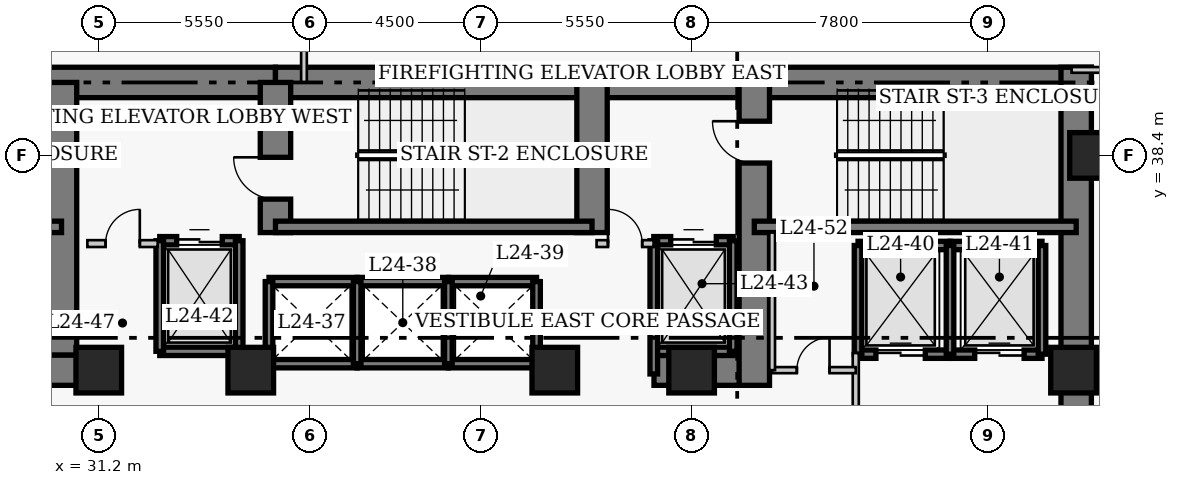
"""IFC4 building model, lengths in metres.
Left out: names, types, materials, properties, quantities, classifications, styles, units other than length and angle.
Written with IfcOpenShell. Run it as: python <this file> out.ifc"""

import sys

from ifc_helpers import new_model, si_unit, direction, frame, frame_2d, origin, origin_2d, place, context, subcontext, project, spatial, rectangle, extrude, element, fill, save


model = new_model("IFC4")
c1 = context("Model", 3, precision=1e-05, world=origin(), true_north=direction((0.0, 1.0)))
c2 = subcontext(c1, "Body", "Model", "MODEL_VIEW")
j1 = project(units=[si_unit("LENGTHUNIT", "METRE"), si_unit("PLANEANGLEUNIT", "RADIAN")], contexts=[c1])
p1 = place(None, origin())
s1 = spatial("IfcSite", under=j1, at=p1, CompositionType="ELEMENT")
p2 = place(p1, origin())
s2 = spatial("IfcBuilding", under=s1, at=p2, CompositionType="ELEMENT")
p3 = place(p2, frame((0.0, 0.0, 99.4)))
s3 = spatial("IfcBuildingStorey", under=s2, at=p3, CompositionType="ELEMENT", Elevation=99.4)
p4 = place(p3, frame((21.5, 40.32, 0.0), z_axis=(0.0, 0.0, 1.0), x_axis=(1.0, 0.0, 0.0)))
e1 = element("IfcWall", 1, at=p4, inside=s3, PredefinedType="SHEAR", context=c2, shape_type="SweptSolid", body=[
    extrude(rectangle(XDim=14.35, YDim=0.8, at=frame_2d((7.175, 0.0))), origin(), (0.0, 0.0, 1.0), 3.8),
])
p5 = place(p3, frame((35.85, 40.32, 0.0), z_axis=(0.0, 0.0, 1.0), x_axis=(1.0, 0.0, 0.0)))
e2 = element("IfcWall", 2, at=p5, inside=s3, PredefinedType="SHEAR", context=c2, shape_type="SweptSolid", body=[
    extrude(rectangle(XDim=12.6, YDim=0.8, at=frame_2d((6.3, 0.0))), origin(), (0.0, 0.0, 1.0), 3.8),
])
p6 = place(p3, frame((48.45, 40.32, 0.0), z_axis=(0.0, 0.0, 1.0), x_axis=(1.0, 0.0, 0.0)))
e3 = element("IfcWall", 3, at=p6, inside=s3, PredefinedType="SHEAR", context=c2, shape_type="SweptSolid", body=[
    extrude(rectangle(XDim=8.87, YDim=0.8, at=frame_2d((4.435, 0.0))), origin(), (0.0, 0.0, 1.0), 3.8),
])
p7 = place(p3, frame((56.92, 27.05, 0.0), z_axis=(0.0, 0.0, 1.0), x_axis=(0.0, 1.0, 0.0)))
e4 = element("IfcWall", 4, at=p7, inside=s3, PredefinedType="SHEAR", context=c2, shape_type="SweptSolid", body=[
    extrude(rectangle(XDim=13.67, YDim=0.8, at=frame_2d((6.835, 0.0))), origin(), (0.0, 0.0, 1.0), 3.8),
])
p8 = place(p3, frame((28.45, 32.75, 0.0), z_axis=(0.0, 0.0, 1.0), x_axis=(1.0, 0.0, 0.0)))
e5 = element("IfcWall", 5, at=p8, inside=s3, PredefinedType="SHEAR", context=c2, shape_type="SweptSolid", body=[
    extrude(rectangle(XDim=2.4, YDim=0.8, at=frame_2d((1.2, 0.0))), origin(), (0.0, 0.0, 1.0), 3.8),
])
p9 = place(p3, frame((45.81, 32.75, 0.0), z_axis=(0.0, 0.0, 1.0), x_axis=(1.0, 0.0, 0.0)))
e6 = element("IfcWall", 6, at=p9, inside=s3, PredefinedType="SHEAR", context=c2, shape_type="SweptSolid", body=[
    extrude(rectangle(XDim=2.64, YDim=0.8, at=frame_2d((1.32, 0.0))), origin(), (0.0, 0.0, 1.0), 3.8),
])
p10 = place(p3, frame((30.22, 33.15, 0.0), z_axis=(0.0, 0.0, 1.0), x_axis=(0.0, 1.0, 0.0)))
e7 = element("IfcWall", 7, at=p10, inside=s3, PredefinedType="SHEAR", context=c2, shape_type="SweptSolid", body=[
    extrude(rectangle(XDim=7.17, YDim=0.8, at=frame_2d((3.585, 0.0))), origin(), (0.0, 0.0, 1.0), 3.8),
])
p11 = place(p3, frame((35.85, 36.37, 0.0), z_axis=(0.0, 0.0, 1.0), x_axis=(0.0, 1.0, 0.0)))
e8 = element("IfcWall", 8, at=p11, inside=s3, PredefinedType="SHEAR", context=c2, shape_type="SweptSolid", body=[
    extrude(rectangle(XDim=3.95, YDim=0.8, at=frame_2d((1.975, 0.0))), origin(), (0.0, 0.0, 1.0), 3.8),
])
p12 = place(p11, frame((0.88, 0.0, 0.0)))
e9 = element("IfcOpeningElement", 9, at=p12, cuts=e8, PredefinedType="OPENING", context=c2, shape_type="SweptSolid", body=[
    extrude(rectangle(XDim=1.1, YDim=2.15, at=frame_2d((0.55, 1.075))), frame((0.0, 0.41, 0.0), z_axis=(0.0, -1.0, 0.0), x_axis=(1.0, 0.0, 0.0)), (0.0, 0.0, 1.0), 0.82),
])
p13 = place(p3, frame((44.18, 36.37, 0.0), z_axis=(0.0, 0.0, 1.0), x_axis=(0.0, 1.0, 0.0)))
e10 = element("IfcWall", 10, at=p13, inside=s3, PredefinedType="SHEAR", context=c2, shape_type="SweptSolid", body=[
    extrude(rectangle(XDim=3.95, YDim=0.8, at=frame_2d((1.975, 0.0))), origin(), (0.0, 0.0, 1.0), 3.8),
])
p14 = place(p3, frame((48.45, 32.35, 0.0), z_axis=(0.0, 0.0, 1.0), x_axis=(0.0, 1.0, 0.0)))
e11 = element("IfcWall", 11, at=p14, inside=s3, PredefinedType="SHEAR", context=c2, shape_type="SweptSolid", body=[
    extrude(rectangle(XDim=7.97, YDim=0.8, at=frame_2d((3.985, 0.0))), origin(), (0.0, 0.0, 1.0), 3.8),
])
p15 = place(p14, frame((5.85, 0.0, 0.0)))
e12 = element("IfcOpeningElement", 12, at=p15, cuts=e11, PredefinedType="OPENING", context=c2, shape_type="SweptSolid", body=[
    extrude(rectangle(XDim=1.1, YDim=2.15, at=frame_2d((0.55, 1.075))), frame((0.0, 0.41, 0.0), z_axis=(0.0, -1.0, 0.0), x_axis=(1.0, 0.0, 0.0)), (0.0, 0.0, 1.0), 0.82),
])
p16 = place(p3, frame((21.9, 36.52, 0.0), z_axis=(0.0, 0.0, 1.0), x_axis=(1.0, 0.0, 0.0)))
e13 = element("IfcWall", 13, at=p16, inside=s3, PredefinedType="SHEAR", context=c2, shape_type="SweptSolid", body=[
    extrude(rectangle(XDim=8.32, YDim=0.3, at=frame_2d((4.16, 0.0))), origin(), (0.0, 0.0, 1.0), 3.8),
])
p17 = place(p16, frame((0.9, 0.0, 0.0)))
e14 = element("IfcOpeningElement", 14, at=p17, cuts=e13, PredefinedType="OPENING", context=c2, shape_type="SweptSolid", body=[
    extrude(rectangle(XDim=1.1, YDim=2.15, at=frame_2d((0.55, 1.075))), frame((0.0, 0.16, 0.0), z_axis=(0.0, -1.0, 0.0), x_axis=(1.0, 0.0, 0.0)), (0.0, 0.0, 1.0), 0.32),
])
p18 = place(p3, frame((35.85, 36.52, 0.0), z_axis=(0.0, 0.0, 1.0), x_axis=(1.0, 0.0, 0.0)))
e15 = element("IfcWall", 15, at=p18, inside=s3, PredefinedType="SHEAR", context=c2, shape_type="SweptSolid", body=[
    extrude(rectangle(XDim=8.33, YDim=0.3, at=frame_2d((4.165, 0.0))), origin(), (0.0, 0.0, 1.0), 3.8),
])
p19 = place(p3, frame((48.45, 36.52, 0.0), z_axis=(0.0, 0.0, 1.0), x_axis=(1.0, 0.0, 0.0)))
e16 = element("IfcWall", 16, at=p19, inside=s3, PredefinedType="SHEAR", context=c2, shape_type="SweptSolid", body=[
    extrude(rectangle(XDim=8.47, YDim=0.3, at=frame_2d((4.235, 0.0))), origin(), (0.0, 0.0, 1.0), 3.8),
])
for number, where, z_axis, x_axis in (
    (17, (57.35, 38.4, 0.0), (0.0, 0.0, 1.0), (1.0, 0.0, 0.0)),
    (18, (31.2, 32.75, 0.0), (0.0, 0.0, 1.0), (1.0, 0.0, 0.0)),
    (19, (35.2, 32.75, 0.0), (0.0, 0.0, 1.0), (1.0, 0.0, 0.0)),
    (20, (43.2, 32.75, 0.0), (0.0, 0.0, 1.0), (1.0, 0.0, 0.0)),
    (21, (46.8, 32.75, 0.0), (0.0, 0.0, 1.0), (1.0, 0.0, 0.0)),
    (22, (56.85, 32.75, 0.0), (0.0, 0.0, 1.0), (1.0, 0.0, 0.0)),
):
    element("IfcColumn", number, at=place(p3, frame(where, z_axis=z_axis, x_axis=x_axis)), inside=s3, PredefinedType="COLUMN", context=c2, shape_type="SweptSolid", body=[
        extrude(rectangle(XDim=1.2, YDim=1.2, at=origin_2d()), origin(), (0.0, 0.0, 1.0), 3.8),
    ])
for number, where, z_axis, x_axis in (
    (23, (35.68, 35.08, 0.0), (0.0, 0.0, 1.0), (1.0, 0.0, 0.0)),
    (24, (35.68, 32.92, 0.0), (0.0, 0.0, 1.0), (1.0, 0.0, 0.0)),
):
    element("IfcWall", number, at=place(p3, frame(where, z_axis=z_axis, x_axis=x_axis)), inside=s3, PredefinedType="SHEAR", context=c2, shape_type="SweptSolid", body=[
        extrude(rectangle(XDim=2.32, YDim=0.22, at=frame_2d((1.16, 0.0))), origin(), (0.0, 0.0, 1.0), 3.8),
    ])
p20 = place(p3, frame((35.68, 32.92, 0.0), z_axis=(0.0, 0.0, 1.0), x_axis=(0.0, 1.0, 0.0)))
e25 = element("IfcWall", 25, at=p20, inside=s3, PredefinedType="SHEAR", context=c2, shape_type="SweptSolid", body=[
    extrude(rectangle(XDim=2.16, YDim=0.2, at=frame_2d((1.08, 0.0))), origin(), (0.0, 0.0, 1.0), 3.8),
])
for number, where, z_axis, x_axis in (
    (26, (38.0, 35.08, 0.0), (0.0, 0.0, 1.0), (1.0, 0.0, 0.0)),
    (27, (38.0, 32.92, 0.0), (0.0, 0.0, 1.0), (1.0, 0.0, 0.0)),
):
    element("IfcWall", number, at=place(p3, frame(where, z_axis=z_axis, x_axis=x_axis)), inside=s3, PredefinedType="SHEAR", context=c2, shape_type="SweptSolid", body=[
        extrude(rectangle(XDim=2.4, YDim=0.22, at=frame_2d((1.2, 0.0))), origin(), (0.0, 0.0, 1.0), 3.8),
    ])
p21 = place(p3, frame((38.0, 32.92, 0.0), z_axis=(0.0, 0.0, 1.0), x_axis=(0.0, 1.0, 0.0)))
e28 = element("IfcWall", 28, at=p21, inside=s3, PredefinedType="SHEAR", context=c2, shape_type="SweptSolid", body=[
    extrude(rectangle(XDim=2.16, YDim=0.2, at=frame_2d((1.08, 0.0))), origin(), (0.0, 0.0, 1.0), 3.8),
])
for number, where, z_axis, x_axis in (
    (29, (40.4, 35.08, 0.0), (0.0, 0.0, 1.0), (1.0, 0.0, 0.0)),
    (30, (40.4, 32.92, 0.0), (0.0, 0.0, 1.0), (1.0, 0.0, 0.0)),
):
    element("IfcWall", number, at=place(p3, frame(where, z_axis=z_axis, x_axis=x_axis)), inside=s3, PredefinedType="SHEAR", context=c2, shape_type="SweptSolid", body=[
        extrude(rectangle(XDim=2.32, YDim=0.22, at=frame_2d((1.16, 0.0))), origin(), (0.0, 0.0, 1.0), 3.8),
    ])
for number, where, z_axis, x_axis in (
    (31, (40.4, 32.92, 0.0), (0.0, 0.0, 1.0), (0.0, 1.0, 0.0)),
    (32, (42.72, 32.92, 0.0), (0.0, 0.0, 1.0), (0.0, 1.0, 0.0)),
):
    element("IfcWall", number, at=place(p3, frame(where, z_axis=z_axis, x_axis=x_axis)), inside=s3, PredefinedType="SHEAR", context=c2, shape_type="SweptSolid", body=[
        extrude(rectangle(XDim=2.16, YDim=0.2, at=frame_2d((1.08, 0.0))), origin(), (0.0, 0.0, 1.0), 3.8),
    ])
p22 = place(p3, frame((51.18, 36.03, 0.0), z_axis=(0.0, 0.0, 1.0), x_axis=(1.0, 0.0, 0.0)))
e33 = element("IfcWall", 33, at=p22, inside=s3, PredefinedType="SHEAR", context=c2, shape_type="SweptSolid", body=[
    extrude(rectangle(XDim=2.42, YDim=0.22, at=frame_2d((1.21, 0.0))), origin(), (0.0, 0.0, 1.0), 3.8),
])
p23 = place(p3, frame((51.18, 33.17, 0.0), z_axis=(0.0, 0.0, 1.0), x_axis=(1.0, 0.0, 0.0)))
e34 = element("IfcWall", 34, at=p23, inside=s3, PredefinedType="SHEAR", context=c2, shape_type="SweptSolid", body=[
    extrude(rectangle(XDim=2.42, YDim=0.22, at=frame_2d((1.21, 0.0))), origin(), (0.0, 0.0, 1.0), 3.8),
])
p24 = place(p23, frame((0.47, 0.0, 0.0)))
e35 = element("IfcOpeningElement", 35, at=p24, cuts=e34, PredefinedType="OPENING", context=c2, shape_type="SweptSolid", body=[
    extrude(rectangle(XDim=1.3, YDim=2.15, at=frame_2d((0.65, 1.075))), frame((0.0, 0.12, 0.0), z_axis=(0.0, -1.0, 0.0), x_axis=(1.0, 0.0, 0.0)), (0.0, 0.0, 1.0), 0.24),
])
p25 = place(p3, frame((51.18, 33.17, 0.0), z_axis=(0.0, 0.0, 1.0), x_axis=(0.0, 1.0, 0.0)))
e36 = element("IfcWall", 36, at=p25, inside=s3, PredefinedType="SHEAR", context=c2, shape_type="SweptSolid", body=[
    extrude(rectangle(XDim=2.86, YDim=0.2, at=frame_2d((1.43, 0.0))), origin(), (0.0, 0.0, 1.0), 3.8),
])
p26 = place(p3, frame((53.6, 36.03, 0.0), z_axis=(0.0, 0.0, 1.0), x_axis=(1.0, 0.0, 0.0)))
e37 = element("IfcWall", 37, at=p26, inside=s3, PredefinedType="SHEAR", context=c2, shape_type="SweptSolid", body=[
    extrude(rectangle(XDim=2.42, YDim=0.22, at=frame_2d((1.21, 0.0))), origin(), (0.0, 0.0, 1.0), 3.8),
])
p27 = place(p3, frame((53.6, 33.17, 0.0), z_axis=(0.0, 0.0, 1.0), x_axis=(1.0, 0.0, 0.0)))
e38 = element("IfcWall", 38, at=p27, inside=s3, PredefinedType="SHEAR", context=c2, shape_type="SweptSolid", body=[
    extrude(rectangle(XDim=2.42, YDim=0.22, at=frame_2d((1.21, 0.0))), origin(), (0.0, 0.0, 1.0), 3.8),
])
p28 = place(p27, frame((0.65, 0.0, 0.0)))
e39 = element("IfcOpeningElement", 39, at=p28, cuts=e38, PredefinedType="OPENING", context=c2, shape_type="SweptSolid", body=[
    extrude(rectangle(XDim=1.3, YDim=2.15, at=frame_2d((0.65, 1.075))), frame((0.0, 0.12, 0.0), z_axis=(0.0, -1.0, 0.0), x_axis=(1.0, 0.0, 0.0)), (0.0, 0.0, 1.0), 0.24),
])
for number, where, z_axis, x_axis in (
    (40, (53.6, 33.17, 0.0), (0.0, 0.0, 1.0), (0.0, 1.0, 0.0)),
    (41, (56.02, 33.17, 0.0), (0.0, 0.0, 1.0), (0.0, 1.0, 0.0)),
):
    element("IfcWall", number, at=place(p3, frame(where, z_axis=z_axis, x_axis=x_axis)), inside=s3, PredefinedType="SHEAR", context=c2, shape_type="SweptSolid", body=[
        extrude(rectangle(XDim=2.86, YDim=0.2, at=frame_2d((1.43, 0.0))), origin(), (0.0, 0.0, 1.0), 3.8),
    ])
p29 = place(p3, frame((32.805, 36.155, 0.0), z_axis=(0.0, 0.0, 1.0), x_axis=(1.0, 0.0, 0.0)))
e42 = element("IfcWall", 42, at=p29, inside=s3, PredefinedType="SHEAR", context=c2, shape_type="SweptSolid", body=[
    extrude(rectangle(XDim=2.09, YDim=0.22, at=frame_2d((1.045, 0.0))), origin(), (0.0, 0.0, 1.0), 3.8),
])
p30 = place(p29, frame((0.445, 0.0, 0.0)))
e43 = element("IfcOpeningElement", 43, at=p30, cuts=e42, PredefinedType="OPENING", context=c2, shape_type="SweptSolid", body=[
    extrude(rectangle(XDim=1.2, YDim=2.15, at=frame_2d((0.6, 1.075))), frame((0.0, 0.12, 0.0), z_axis=(0.0, -1.0, 0.0), x_axis=(1.0, 0.0, 0.0)), (0.0, 0.0, 1.0), 0.24),
])
p31 = place(p3, frame((32.805, 33.245, 0.0), z_axis=(0.0, 0.0, 1.0), x_axis=(1.0, 0.0, 0.0)))
e44 = element("IfcWall", 44, at=p31, inside=s3, PredefinedType="SHEAR", context=c2, shape_type="SweptSolid", body=[
    extrude(rectangle(XDim=2.09, YDim=0.22, at=frame_2d((1.045, 0.0))), origin(), (0.0, 0.0, 1.0), 3.8),
])
for number, where, z_axis, x_axis in (
    (45, (32.805, 33.245, 0.0), (0.0, 0.0, 1.0), (0.0, 1.0, 0.0)),
    (46, (34.895, 33.245, 0.0), (0.0, 0.0, 1.0), (0.0, 1.0, 0.0)),
):
    element("IfcWall", number, at=place(p3, frame(where, z_axis=z_axis, x_axis=x_axis)), inside=s3, PredefinedType="SHEAR", context=c2, shape_type="SweptSolid", body=[
        extrude(rectangle(XDim=2.91, YDim=0.2, at=frame_2d((1.455, 0.0))), origin(), (0.0, 0.0, 1.0), 3.8),
    ])
p32 = place(p3, frame((45.805, 36.155, 0.0), z_axis=(0.0, 0.0, 1.0), x_axis=(1.0, 0.0, 0.0)))
e47 = element("IfcWall", 47, at=p32, inside=s3, PredefinedType="SHEAR", context=c2, shape_type="SweptSolid", body=[
    extrude(rectangle(XDim=2.09, YDim=0.22, at=frame_2d((1.045, 0.0))), origin(), (0.0, 0.0, 1.0), 3.8),
])
p33 = place(p32, frame((0.445, 0.0, 0.0)))
e48 = element("IfcOpeningElement", 48, at=p33, cuts=e47, PredefinedType="OPENING", context=c2, shape_type="SweptSolid", body=[
    extrude(rectangle(XDim=1.2, YDim=2.15, at=frame_2d((0.6, 1.075))), frame((0.0, 0.12, 0.0), z_axis=(0.0, -1.0, 0.0), x_axis=(1.0, 0.0, 0.0)), (0.0, 0.0, 1.0), 0.24),
])
p34 = place(p3, frame((45.805, 33.245, 0.0), z_axis=(0.0, 0.0, 1.0), x_axis=(1.0, 0.0, 0.0)))
e49 = element("IfcWall", 49, at=p34, inside=s3, PredefinedType="SHEAR", context=c2, shape_type="SweptSolid", body=[
    extrude(rectangle(XDim=2.09, YDim=0.22, at=frame_2d((1.045, 0.0))), origin(), (0.0, 0.0, 1.0), 3.8),
])
p35 = place(p3, frame((45.805, 32.65, 0.0), z_axis=(0.0, 0.0, 1.0), x_axis=(0.0, 1.0, 0.0)))
e50 = element("IfcWall", 50, at=p35, inside=s3, PredefinedType="SHEAR", context=c2, shape_type="SweptSolid", body=[
    extrude(rectangle(XDim=3.505, YDim=0.2, at=frame_2d((1.752, 0.0))), origin(), (0.0, 0.0, 1.0), 3.8),
])
p36 = place(p3, frame((47.895, 33.245, 0.0), z_axis=(0.0, 0.0, 1.0), x_axis=(0.0, 1.0, 0.0)))
e51 = element("IfcWall", 51, at=p36, inside=s3, PredefinedType="SHEAR", context=c2, shape_type="SweptSolid", body=[
    extrude(rectangle(XDim=2.91, YDim=0.2, at=frame_2d((1.455, 0.0))), origin(), (0.0, 0.0, 1.0), 3.8),
])
p37 = place(p3, frame((30.9, 36.08, 0.0), z_axis=(0.0, 0.0, 1.0), x_axis=(1.0, 0.0, 0.0)))
e52 = element("IfcWall", 52, at=p37, inside=s3, PredefinedType="PARTITIONING", context=c2, shape_type="SweptSolid", body=[
    extrude(rectangle(XDim=1.85, YDim=0.18, at=frame_2d((0.925, 0.0))), origin(), (0.0, 0.0, 1.0), 3.54),
])
p38 = place(p37, frame((0.48, 0.0, 0.0)))
e53 = element("IfcOpeningElement", 53, at=p38, cuts=e52, PredefinedType="OPENING", context=c2, shape_type="SweptSolid", body=[
    extrude(rectangle(XDim=0.9, YDim=2.15, at=frame_2d((0.45, 1.075))), frame((0.0, 0.1, 0.0), z_axis=(0.0, -1.0, 0.0), x_axis=(1.0, 0.0, 0.0)), (0.0, 0.0, 1.0), 0.2),
])
p39 = place(p3, frame((44.3, 36.08, 0.0), z_axis=(0.0, 0.0, 1.0), x_axis=(1.0, 0.0, 0.0)))
e54 = element("IfcWall", 54, at=p39, inside=s3, PredefinedType="PARTITIONING", context=c2, shape_type="SweptSolid", body=[
    extrude(rectangle(XDim=1.5, YDim=0.18, at=frame_2d((0.75, 0.0))), origin(), (0.0, 0.0, 1.0), 3.54),
])
p40 = place(p39, frame((0.3, 0.0, 0.0)))
e55 = element("IfcOpeningElement", 55, at=p40, cuts=e54, PredefinedType="OPENING", context=c2, shape_type="SweptSolid", body=[
    extrude(rectangle(XDim=0.9, YDim=2.15, at=frame_2d((0.45, 1.075))), frame((0.0, 0.1, 0.0), z_axis=(0.0, -1.0, 0.0), x_axis=(1.0, 0.0, 0.0)), (0.0, 0.0, 1.0), 0.2),
])
p41 = place(p3, frame((51.12, 29.5, 0.0), z_axis=(0.0, 0.0, 1.0), x_axis=(0.0, 1.0, 0.0)))
e56 = element("IfcWall", 56, at=p41, inside=s3, PredefinedType="PARTITIONING", context=c2, shape_type="SweptSolid", body=[
    extrude(rectangle(XDim=3.7, YDim=0.16, at=frame_2d((1.85, 0.0))), origin(), (0.0, 0.0, 1.0), 3.54),
])
p42 = place(p41, frame((0.9, 0.0, 0.0)))
e57 = element("IfcOpeningElement", 57, at=p42, cuts=e56, PredefinedType="OPENING", context=c2, shape_type="SweptSolid", body=[
    extrude(rectangle(XDim=1.1, YDim=2.15, at=frame_2d((0.55, 1.075))), frame((0.0, 0.09, 0.0), z_axis=(0.0, -1.0, 0.0), x_axis=(1.0, 0.0, 0.0)), (0.0, 0.0, 1.0), 0.18),
])
p43 = place(p3, frame((48.92, 32.75, 0.0), z_axis=(0.0, 0.0, 1.0), x_axis=(1.0, 0.0, 0.0)))
e58 = element("IfcWall", 58, at=p43, inside=s3, PredefinedType="PARTITIONING", context=c2, shape_type="SweptSolid", body=[
    extrude(rectangle(XDim=2.2, YDim=0.16, at=frame_2d((1.1, 0.0))), origin(), (0.0, 0.0, 1.0), 3.54),
])
p44 = place(p43, frame((0.65, 0.0, 0.0)))
e59 = element("IfcOpeningElement", 59, at=p44, cuts=e58, PredefinedType="OPENING", context=c2, shape_type="SweptSolid", body=[
    extrude(rectangle(XDim=0.86, YDim=2.05, at=frame_2d((0.43, 1.025))), frame((0.0, 0.09, 0.0), z_axis=(0.0, -1.0, 0.0), x_axis=(1.0, 0.0, 0.0)), (0.0, 0.0, 1.0), 0.18),
])
p45 = place(p3, frame((48.92, 32.75, 0.0), z_axis=(0.0, 0.0, 1.0), x_axis=(0.0, 1.0, 0.0)))
e60 = element("IfcWall", 60, at=p45, inside=s3, PredefinedType="PARTITIONING", context=c2, shape_type="SweptSolid", body=[
    extrude(rectangle(XDim=3.62, YDim=0.15, at=frame_2d((1.81, 0.0))), origin(), (0.0, 0.0, 1.0), 3.54),
])
p46 = place(p3, frame((56.8, 40.65, 0.0), z_axis=(0.0, 0.0, 1.0), x_axis=(1.0, 0.0, 0.0)))
e61 = element("IfcWall", 61, at=p46, inside=s3, PredefinedType="PARTITIONING", context=c2, shape_type="SweptSolid", body=[
    extrude(rectangle(XDim=4.56, YDim=0.15, at=frame_2d((2.28, 0.0))), origin(), (0.0, 0.0, 1.0), 3.54),
])
p47 = place(p46, frame((2.95, 0.0, 0.0)))
e62 = element("IfcOpeningElement", 62, at=p47, cuts=e61, PredefinedType="OPENING", context=c2, shape_type="SweptSolid", body=[
    extrude(rectangle(XDim=1.0, YDim=2.15, at=frame_2d((0.5, 1.075))), frame((0.0, 0.085, 0.0), z_axis=(0.0, -1.0, 0.0), x_axis=(1.0, 0.0, 0.0)), (0.0, 0.0, 1.0), 0.17),
])
p48 = place(p3, frame((36.6, 40.32, 0.0), z_axis=(0.0, 0.0, 1.0), x_axis=(0.0, 1.0, 0.0)))
e63 = element("IfcWall", 63, at=p48, inside=s3, PredefinedType="PARTITIONING", context=c2, shape_type="SweptSolid", body=[
    extrude(rectangle(XDim=3.445, YDim=0.15, at=frame_2d((1.723, 0.0))), origin(), (0.0, 0.0, 1.0), 3.54),
])
p49 = place(p24, origin())
e64 = element("IfcDoor", 64, at=p49, inside=s3, OperationType="DOUBLE_DOOR_SLIDING", PredefinedType="DOOR", context=c2, shape_type="SweptSolid", body=[
    extrude(rectangle(XDim=1.3, YDim=2.15, at=frame_2d((0.65, 1.075))), frame((0.0, 0.025, 0.0), z_axis=(0.0, -1.0, 0.0), x_axis=(1.0, 0.0, 0.0)), (0.0, 0.0, 1.0), 0.05),
])
fill(e35, e64)
p50 = place(p28, origin())
e65 = element("IfcDoor", 65, at=p50, inside=s3, OperationType="DOUBLE_DOOR_SLIDING", PredefinedType="DOOR", context=c2, shape_type="SweptSolid", body=[
    extrude(rectangle(XDim=1.3, YDim=2.15, at=frame_2d((0.65, 1.075))), frame((0.0, 0.025, 0.0), z_axis=(0.0, -1.0, 0.0), x_axis=(1.0, 0.0, 0.0)), (0.0, 0.0, 1.0), 0.05),
])
fill(e39, e65)
p51 = place(p30, origin())
e66 = element("IfcDoor", 66, at=p51, inside=s3, OperationType="DOUBLE_DOOR_SLIDING", PredefinedType="DOOR", context=c2, shape_type="SweptSolid", body=[
    extrude(rectangle(XDim=1.2, YDim=2.15, at=frame_2d((0.6, 1.075))), frame((0.0, 0.025, 0.0), z_axis=(0.0, -1.0, 0.0), x_axis=(1.0, 0.0, 0.0)), (0.0, 0.0, 1.0), 0.05),
])
fill(e43, e66)
p52 = place(p33, origin())
e67 = element("IfcDoor", 67, at=p52, inside=s3, OperationType="DOUBLE_DOOR_SLIDING", PredefinedType="DOOR", context=c2, shape_type="SweptSolid", body=[
    extrude(rectangle(XDim=1.2, YDim=2.15, at=frame_2d((0.6, 1.075))), frame((0.0, 0.025, 0.0), z_axis=(0.0, -1.0, 0.0), x_axis=(1.0, 0.0, 0.0)), (0.0, 0.0, 1.0), 0.05),
])
fill(e48, e67)
p53 = place(p38, origin())
e68 = element("IfcDoor", 68, at=p53, inside=s3, OperationType="SINGLE_SWING_RIGHT", PredefinedType="DOOR", context=c2, shape_type="SweptSolid", body=[
    extrude(rectangle(XDim=0.9, YDim=2.15, at=frame_2d((0.45, 1.075))), frame((0.0, 0.025, 0.0), z_axis=(0.0, -1.0, 0.0), x_axis=(1.0, 0.0, 0.0)), (0.0, 0.0, 1.0), 0.05),
])
fill(e53, e68)
p54 = place(p40, origin())
e69 = element("IfcDoor", 69, at=p54, inside=s3, OperationType="SINGLE_SWING_LEFT", PredefinedType="DOOR", context=c2, shape_type="SweptSolid", body=[
    extrude(rectangle(XDim=0.9, YDim=2.15, at=frame_2d((0.45, 1.075))), frame((0.0, 0.025, 0.0), z_axis=(0.0, -1.0, 0.0), x_axis=(1.0, 0.0, 0.0)), (0.0, 0.0, 1.0), 0.05),
])
fill(e55, e69)
p55 = place(p44, origin())
e70 = element("IfcDoor", 70, at=p55, inside=s3, OperationType="SINGLE_SWING_RIGHT", PredefinedType="DOOR", context=c2, shape_type="SweptSolid", body=[
    extrude(rectangle(XDim=0.86, YDim=2.05, at=frame_2d((0.43, 1.025))), frame((0.0, 0.025, 0.0), z_axis=(0.0, -1.0, 0.0), x_axis=(1.0, 0.0, 0.0)), (0.0, 0.0, 1.0), 0.05),
])
fill(e59, e70)
p56 = place(p12, origin())
e71 = element("IfcDoor", 71, at=p56, inside=s3, OperationType="SINGLE_SWING_RIGHT", PredefinedType="DOOR", context=c2, shape_type="SweptSolid", body=[
    extrude(rectangle(XDim=1.1, YDim=2.15, at=frame_2d((0.55, 1.075))), frame((0.0, 0.025, 0.0), z_axis=(0.0, -1.0, 0.0), x_axis=(1.0, 0.0, 0.0)), (0.0, 0.0, 1.0), 0.05),
])
fill(e9, e71)
p57 = place(p15, origin())
e72 = element("IfcDoor", 72, at=p57, inside=s3, OperationType="SINGLE_SWING_RIGHT", PredefinedType="DOOR", context=c2, shape_type="SweptSolid", body=[
    extrude(rectangle(XDim=1.1, YDim=2.15, at=frame_2d((0.55, 1.075))), frame((0.0, 0.025, 0.0), z_axis=(0.0, -1.0, 0.0), x_axis=(1.0, 0.0, 0.0)), (0.0, 0.0, 1.0), 0.05),
])
fill(e12, e72)
save(model, sys.argv[1])
